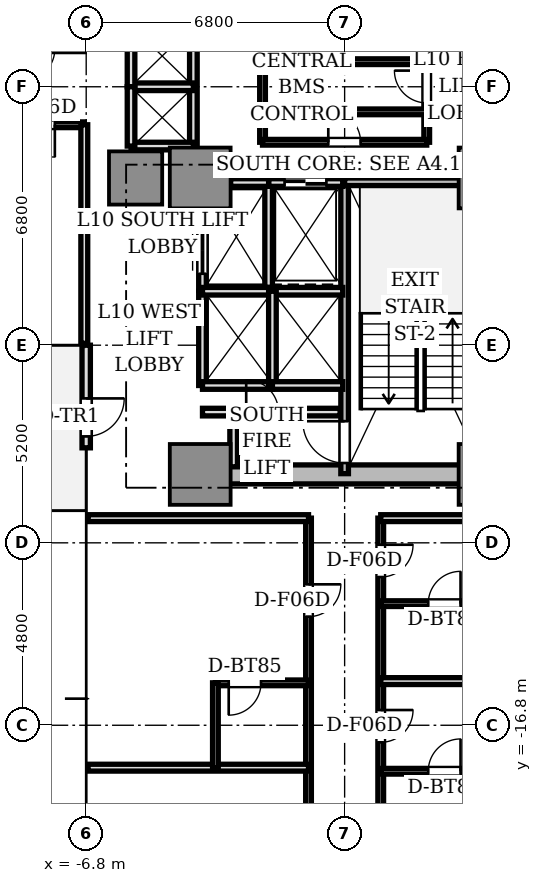
"""IFC4 building model, lengths in metres.
Left out: names, types, materials, properties, quantities, classifications, styles, units other than length and angle.
Written with IfcOpenShell. Run it as: python <this file> out.ifc"""

import sys

from ifc_helpers import new_model, si_unit, direction, frame, frame_2d, origin, origin_2d, place, context, subcontext, project, spatial, rectangle, extrude, source, transform, mapped, element, fill, save


model = new_model("IFC4")
c1 = context("Model", 3, precision=1e-05, world=origin(), true_north=direction((0.0, 1.0)))
c2 = subcontext(c1, "Body", "Model", "MODEL_VIEW")
j1 = project(units=[si_unit("LENGTHUNIT", "METRE"), si_unit("PLANEANGLEUNIT", "RADIAN")], contexts=[c1])
p1 = place(None, origin())
s1 = spatial("IfcSite", under=j1, at=p1, CompositionType="ELEMENT")
p2 = place(p1, origin())
s2 = spatial("IfcBuilding", under=s1, at=p2, CompositionType="ELEMENT")
p3 = place(p2, frame((0.0, 0.0, 39.85)))
s3 = spatial("IfcBuildingStorey", under=s2, at=p3, CompositionType="ELEMENT", Elevation=39.85)
p4 = place(p3, frame((-3.55, -10.2, 0.0), z_axis=(0.0, 0.0, 1.0), x_axis=(1.0, 0.0, 0.0)))
e1 = element("IfcWall", 1, at=p4, inside=s3, PredefinedType="SHEAR", context=c2, shape_type="SweptSolid", body=[
    extrude(rectangle(XDim=7.1, YDim=0.5, at=frame_2d((3.55, 0.0))), origin(), (0.0, 0.0, 1.0), 3.11),
])
m1 = source(origin(), c2, "Body", "SweptSolid", [
    extrude(rectangle(XDim=1.6, YDim=1.6, at=origin_2d()), origin(), (0.0, 0.0, 1.0), 3.11),
])
for number, where, z_axis, x_axis in (
    (2, (-3.8, -2.4, 0.0), (0.0, 0.0, 1.0), (1.0, 0.0, 0.0)),
    (3, (3.8, -2.4, 0.0), (0.0, 0.0, 1.0), (1.0, 0.0, 0.0)),
    (4, (-3.8, -10.2, 0.0), (0.0, 0.0, 1.0), (1.0, 0.0, 0.0)),
    (5, (3.8, -10.2, 0.0), (0.0, 0.0, 1.0), (1.0, 0.0, 0.0)),
):
    element("IfcColumn", number, at=place(p3, frame(where, z_axis=z_axis, x_axis=x_axis)), inside=s3, PredefinedType="COLUMN", context=c2, shape_type="MappedRepresentation", body=[
        mapped(m1, transform((0.0, 0.0, 0.0), scale=1.0)),
    ])
m2 = source(origin(), c2, "Body", "SweptSolid", [
    extrude(rectangle(XDim=1.4, YDim=1.4, at=origin_2d()), origin(), (0.0, 0.0, 1.0), 3.11),
])
p5 = place(p3, frame((-5.5, -2.4, 0.0), z_axis=(0.0, 0.0, 1.0), x_axis=(1.0, 0.0, 0.0)))
e6 = element("IfcColumn", 6, at=p5, inside=s3, PredefinedType="COLUMN", context=c2, shape_type="MappedRepresentation", body=[
    mapped(m2, transform((0.0, 0.0, 0.0), scale=1.0)),
])
p6 = place(p3, frame((-6.8, -6.8, 0.0), z_axis=(0.0, 0.0, 1.0), x_axis=(0.0, -1.0, 0.0)))
e7 = element("IfcWall", 7, at=p6, inside=s3, PredefinedType="STANDARD", context=c2, shape_type="SweptSolid", body=[
    extrude(rectangle(XDim=2.7, YDim=0.22, at=frame_2d((1.35, 0.0))), origin(), (0.0, 0.0, 1.0), 3.11),
])
p7 = place(p6, frame((1.4, 0.0, 0.0)))
e8 = element("IfcOpeningElement", 8, at=p7, cuts=e7, PredefinedType="OPENING", context=c2, shape_type="SweptSolid", body=[
    extrude(rectangle(XDim=1.0, YDim=2.2, at=frame_2d((0.5, 1.1))), frame((0.0, 0.12, 0.0), z_axis=(0.0, -1.0, 0.0), x_axis=(1.0, 0.0, 0.0)), (0.0, 0.0, 1.0), 0.24),
])
p8 = place(p3, frame((0.0, -10.18, 0.0), z_axis=(0.0, 0.0, 1.0), x_axis=(0.0, 1.0, 0.0)))
e9 = element("IfcWall", 9, at=p8, inside=s3, PredefinedType="SOLIDWALL", context=c2, shape_type="SweptSolid", body=[
    extrude(rectangle(XDim=7.68, YDim=0.2, at=frame_2d((3.84, 0.0))), origin(), (0.0, 0.0, 1.0), 3.11),
])
p9 = place(p8, frame((0.28, 0.0, 0.0)))
e10 = element("IfcOpeningElement", 10, at=p9, cuts=e9, PredefinedType="OPENING", context=c2, shape_type="SweptSolid", body=[
    extrude(rectangle(XDim=1.1, YDim=2.15, at=frame_2d((0.55, 1.075))), frame((0.0, 0.11, 0.0), z_axis=(0.0, -1.0, 0.0), x_axis=(1.0, 0.0, 0.0)), (0.0, 0.0, 1.0), 0.22),
])
p10 = place(p3, frame((0.0, -2.5, 0.0), z_axis=(0.0, 0.0, 1.0), x_axis=(1.0, 0.0, 0.0)))
e11 = element("IfcWall", 11, at=p10, inside=s3, PredefinedType="SOLIDWALL", context=c2, shape_type="SweptSolid", body=[
    extrude(rectangle(XDim=3.72, YDim=0.2, at=frame_2d((1.86, 0.0))), origin(), (0.0, 0.0, 1.0), 3.11),
])
p11 = place(p3, frame((-2.0, -5.28, 0.0), z_axis=(0.0, 0.0, 1.0), x_axis=(0.0, 1.0, 0.0)))
e12 = element("IfcWall", 12, at=p11, inside=s3, PredefinedType="SOLIDWALL", context=c2, shape_type="SweptSolid", body=[
    extrude(rectangle(XDim=2.78, YDim=0.2, at=frame_2d((1.39, 0.0))), origin(), (0.0, 0.0, 1.0), 2.66),
])
p12 = place(p3, frame((-2.0, -2.52, 0.0), z_axis=(0.0, 0.0, 1.0), x_axis=(1.0, 0.0, 0.0)))
e13 = element("IfcWall", 13, at=p12, inside=s3, PredefinedType="SOLIDWALL", context=c2, shape_type="SweptSolid", body=[
    extrude(rectangle(XDim=1.95, YDim=0.2, at=frame_2d((0.975, 0.0))), origin(), (0.0, 0.0, 1.0), 2.66),
])
p13 = place(p12, frame((0.42, 0.0, 0.0)))
e14 = element("IfcOpeningElement", 14, at=p13, cuts=e13, PredefinedType="OPENING", context=c2, shape_type="SweptSolid", body=[
    extrude(rectangle(XDim=1.1, YDim=2.2, at=frame_2d((0.55, 1.1))), frame((0.0, 0.11, 0.0), z_axis=(0.0, -1.0, 0.0), x_axis=(1.0, 0.0, 0.0)), (0.0, 0.0, 1.0), 0.22),
])
p14 = place(p3, frame((-3.0, -2.52, 0.0), z_axis=(0.0, 0.0, 1.0), x_axis=(1.0, 0.0, 0.0)))
e15 = element("IfcWall", 15, at=p14, inside=s3, PredefinedType="SOLIDWALL", context=c2, shape_type="SweptSolid", body=[
    extrude(rectangle(XDim=1.0, YDim=0.2, at=frame_2d((0.5, 0.0))), origin(), (0.0, 0.0, 1.0), 2.66),
])
p15 = place(p3, frame((-3.74, -5.36, 0.0), z_axis=(0.0, 0.0, 1.0), x_axis=(0.0, 1.0, 0.0)))
e16 = element("IfcWall", 16, at=p15, inside=s3, PredefinedType="SOLIDWALL", context=c2, shape_type="SweptSolid", body=[
    extrude(rectangle(XDim=2.08, YDim=0.2, at=frame_2d((1.04, 0.0))), origin(), (0.0, 0.0, 1.0), 2.66),
])
p16 = place(p15, frame((0.44, 0.0, 0.0)))
e17 = element("IfcOpeningElement", 17, at=p16, cuts=e16, PredefinedType="OPENING", context=c2, shape_type="SweptSolid", body=[
    extrude(rectangle(XDim=1.2, YDim=2.2, at=frame_2d((0.6, 1.1))), frame((0.0, 0.11, 0.0), z_axis=(0.0, -1.0, 0.0), x_axis=(1.0, 0.0, 0.0)), (0.0, 0.0, 1.0), 0.22),
])
p17 = place(p3, frame((-3.74, -7.86, 0.0), z_axis=(0.0, 0.0, 1.0), x_axis=(0.0, 1.0, 0.0)))
e18 = element("IfcWall", 18, at=p17, inside=s3, PredefinedType="SOLIDWALL", context=c2, shape_type="SweptSolid", body=[
    extrude(rectangle(XDim=2.48, YDim=0.2, at=frame_2d((1.24, 0.0))), origin(), (0.0, 0.0, 1.0), 2.66),
])
p18 = place(p3, frame((-3.74, -7.86, 0.0), z_axis=(0.0, 0.0, 1.0), x_axis=(1.0, 0.0, 0.0)))
e19 = element("IfcWall", 19, at=p18, inside=s3, PredefinedType="SOLIDWALL", context=c2, shape_type="SweptSolid", body=[
    extrude(rectangle(XDim=1.84, YDim=0.2, at=frame_2d((0.92, 0.0))), origin(), (0.0, 0.0, 1.0), 2.66),
])
p19 = place(p3, frame((-3.74, -5.38, 0.0), z_axis=(0.0, 0.0, 1.0), x_axis=(1.0, 0.0, 0.0)))
e20 = element("IfcWall", 20, at=p19, inside=s3, PredefinedType="SOLIDWALL", context=c2, shape_type="SweptSolid", body=[
    extrude(rectangle(XDim=3.69, YDim=0.2, at=frame_2d((1.845, 0.0))), origin(), (0.0, 0.0, 1.0), 2.66),
])
p20 = place(p3, frame((-1.9, -7.86, 0.0), z_axis=(0.0, 0.0, 1.0), x_axis=(0.0, 1.0, 0.0)))
e21 = element("IfcWall", 21, at=p20, inside=s3, PredefinedType="SOLIDWALL", context=c2, shape_type="SweptSolid", body=[
    extrude(rectangle(XDim=2.48, YDim=0.2, at=frame_2d((1.24, 0.0))), origin(), (0.0, 0.0, 1.0), 2.66),
])
p21 = place(p3, frame((-1.9, -7.86, 0.0), z_axis=(0.0, 0.0, 1.0), x_axis=(1.0, 0.0, 0.0)))
e22 = element("IfcWall", 22, at=p21, inside=s3, PredefinedType="SOLIDWALL", context=c2, shape_type="SweptSolid", body=[
    extrude(rectangle(XDim=1.85, YDim=0.2, at=frame_2d((0.925, 0.0))), origin(), (0.0, 0.0, 1.0), 2.66),
])
p22 = place(p3, frame((-3.98, -1.56, 0.0), z_axis=(0.0, 0.0, 1.0), x_axis=(0.0, 1.0, 0.0)))
e23 = element("IfcWall", 23, at=p22, inside=s3, PredefinedType="SOLIDWALL", context=c2, shape_type="SweptSolid", body=[
    extrude(rectangle(XDim=3.12, YDim=0.2, at=frame_2d((1.56, 0.0))), origin(), (0.0, 0.0, 1.0), 2.18),
])
for number, where, z_axis, x_axis in (
    (24, (-5.62, -1.56, 0.0), (0.0, 0.0, 1.0), (1.0, 0.0, 0.0)),
    (25, (-5.62, 0.0, 0.0), (0.0, 0.0, 1.0), (1.0, 0.0, 0.0)),
):
    element("IfcWall", number, at=place(p3, frame(where, z_axis=z_axis, x_axis=x_axis)), inside=s3, PredefinedType="SOLIDWALL", context=c2, shape_type="SweptSolid", body=[
        extrude(rectangle(XDim=1.64, YDim=0.2, at=frame_2d((0.82, 0.0))), origin(), (0.0, 0.0, 1.0), 2.66),
    ])
for number, where, z_axis, x_axis in (
    (26, (-5.62, 0.0, 0.0), (0.0, 0.0, 1.0), (0.0, 1.0, 0.0)),
    (27, (-5.62, -1.56, 0.0), (0.0, 0.0, 1.0), (0.0, 1.0, 0.0)),
):
    element("IfcWall", number, at=place(p3, frame(where, z_axis=z_axis, x_axis=x_axis)), inside=s3, PredefinedType="SOLIDWALL", context=c2, shape_type="SweptSolid", body=[
        extrude(rectangle(XDim=1.56, YDim=0.2, at=frame_2d((0.78, 0.0))), origin(), (0.0, 0.0, 1.0), 2.66),
    ])
p23 = place(p3, frame((-3.74, -8.56, 0.0), z_axis=(0.0, 0.0, 1.0), x_axis=(1.0, 0.0, 0.0)))
e28 = element("IfcWall", 28, at=p23, inside=s3, PredefinedType="SOLIDWALL", context=c2, shape_type="SweptSolid", body=[
    extrude(rectangle(XDim=3.62, YDim=0.2, at=frame_2d((1.81, 0.0))), origin(), (0.0, 0.0, 1.0), 2.66),
])
p24 = place(p23, frame((1.15, 0.0, 0.0)))
e29 = element("IfcOpeningElement", 29, at=p24, cuts=e28, PredefinedType="OPENING", context=c2, shape_type="SweptSolid", body=[
    extrude(rectangle(XDim=0.85, YDim=2.1, at=frame_2d((0.425, 1.05))), frame((0.0, 0.11, 0.0), z_axis=(0.0, -1.0, 0.0), x_axis=(1.0, 0.0, 0.0)), (0.0, 0.0, 1.0), 0.22),
])
p25 = place(p3, frame((-2.92, -10.0, 0.0), z_axis=(0.0, 0.0, 1.0), x_axis=(0.0, 1.0, 0.0)))
e30 = element("IfcWall", 30, at=p25, inside=s3, PredefinedType="SOLIDWALL", context=c2, shape_type="SweptSolid", body=[
    extrude(rectangle(XDim=1.44, YDim=0.2, at=frame_2d((0.72, 0.0))), origin(), (0.0, 0.0, 1.0), 2.66),
])
p26 = place(p3, frame((2.16, -1.46, 0.0), z_axis=(0.0, 0.0, 1.0), x_axis=(0.0, 1.0, 0.0)))
e31 = element("IfcWall", 31, at=p26, inside=s3, PredefinedType="PARTITIONING", context=c2, shape_type="SweptSolid", body=[
    extrude(rectangle(XDim=2.92, YDim=0.15, at=frame_2d((1.46, 0.0))), origin(), (0.0, 0.0, 1.0), 2.66),
])
p27 = place(p26, frame((1.035, 0.0, 0.0)))
e32 = element("IfcOpeningElement", 32, at=p27, cuts=e31, PredefinedType="OPENING", context=c2, shape_type="SweptSolid", body=[
    extrude(rectangle(XDim=0.85, YDim=2.1, at=frame_2d((0.425, 1.05))), frame((0.0, 0.085, 0.0), z_axis=(0.0, -1.0, 0.0), x_axis=(1.0, 0.0, 0.0)), (0.0, 0.0, 1.0), 0.17),
])
p28 = place(p3, frame((-2.16, -1.46, 0.0), z_axis=(0.0, 0.0, 1.0), x_axis=(0.0, 1.0, 0.0)))
e33 = element("IfcWall", 33, at=p28, inside=s3, PredefinedType="PARTITIONING", context=c2, shape_type="SweptSolid", body=[
    extrude(rectangle(XDim=2.92, YDim=0.15, at=frame_2d((1.46, 0.0))), origin(), (0.0, 0.0, 1.0), 2.66),
])
p29 = place(p3, frame((-2.16, -1.46, 0.0), z_axis=(0.0, 0.0, 1.0), x_axis=(1.0, 0.0, 0.0)))
e34 = element("IfcWall", 34, at=p29, inside=s3, PredefinedType="PARTITIONING", context=c2, shape_type="SweptSolid", body=[
    extrude(rectangle(XDim=4.32, YDim=0.15, at=frame_2d((2.16, 0.0))), origin(), (0.0, 0.0, 1.0), 2.66),
])
p30 = place(p29, frame((1.73, 0.0, 0.0)))
e35 = element("IfcOpeningElement", 35, at=p30, cuts=e34, PredefinedType="OPENING", context=c2, shape_type="SweptSolid", body=[
    extrude(rectangle(XDim=0.85, YDim=2.1, at=frame_2d((0.425, 1.05))), frame((0.0, 0.085, 0.0), z_axis=(0.0, -1.0, 0.0), x_axis=(1.0, 0.0, 0.0)), (0.0, 0.0, 1.0), 0.17),
])
for number, where, z_axis, x_axis in (
    (36, (-2.16, 0.66, 0.0), (0.0, 0.0, 1.0), (1.0, 0.0, 0.0)),
    (37, (-2.16, -0.66, 0.0), (0.0, 0.0, 1.0), (1.0, 0.0, 0.0)),
):
    element("IfcWall", number, at=place(p3, frame(where, z_axis=z_axis, x_axis=x_axis)), inside=s3, PredefinedType="PARTITIONING", context=c2, shape_type="SweptSolid", body=[
        extrude(rectangle(XDim=4.32, YDim=0.15, at=frame_2d((2.16, 0.0))), origin(), (0.0, 0.0, 1.0), 2.66),
    ])
p31 = place(p3, frame((-6.85, -1.0, 0.0), z_axis=(0.0, 0.0, 1.0), x_axis=(-1.0, 0.0, 0.0)))
e38 = element("IfcWall", 38, at=p31, inside=s3, PredefinedType="PARTITIONING", context=c2, shape_type="SweptSolid", body=[
    extrude(rectangle(XDim=2.5, YDim=0.15, at=frame_2d((1.25, 0.0))), origin(), (0.0, 0.0, 1.0), 2.66),
])
p32 = place(p31, frame((0.775, 0.0, 0.0)))
e39 = element("IfcOpeningElement", 39, at=p32, cuts=e38, PredefinedType="OPENING", context=c2, shape_type="SweptSolid", body=[
    extrude(rectangle(XDim=0.85, YDim=2.1, at=frame_2d((0.425, 1.05))), frame((0.0, 0.085, 0.0), z_axis=(0.0, -1.0, 0.0), x_axis=(1.0, 0.0, 0.0)), (0.0, 0.0, 1.0), 0.17),
])
p33 = place(p3, frame((-6.85, -1.0, 0.0), z_axis=(0.0, 0.0, 1.0), x_axis=(0.0, -1.0, 0.0)))
e40 = element("IfcWall", 40, at=p33, inside=s3, PredefinedType="PARTITIONING", context=c2, shape_type="SweptSolid", body=[
    extrude(rectangle(XDim=5.75, YDim=0.18, at=frame_2d((2.875, 0.0))), origin(), (0.0, 0.0, 1.0), 2.66),
])
p34 = place(p3, frame((0.95, -11.35, 0.0), z_axis=(0.0, 0.0, 1.0), x_axis=(0.0, -1.0, 0.0)))
e41 = element("IfcWall", 41, at=p34, inside=s3, PredefinedType="PARTITIONING", context=c2, shape_type="SweptSolid", body=[
    extrude(rectangle(XDim=13.4, YDim=0.15, at=frame_2d((6.7, 0.0))), origin(), (0.0, 0.0, 1.0), 2.66),
])
p35 = place(p34, frame((0.7, 0.0, 0.0)))
e42 = element("IfcOpeningElement", 42, at=p35, cuts=e41, PredefinedType="OPENING", context=c2, shape_type="SweptSolid", body=[
    extrude(rectangle(XDim=0.85, YDim=2.1, at=frame_2d((0.425, 1.05))), frame((0.0, 0.085, 0.0), z_axis=(0.0, -1.0, 0.0), x_axis=(1.0, 0.0, 0.0)), (0.0, 0.0, 1.0), 0.17),
])
p36 = place(p34, frame((5.049, 0.0, 0.0)))
e43 = element("IfcOpeningElement", 43, at=p36, cuts=e41, PredefinedType="OPENING", context=c2, shape_type="SweptSolid", body=[
    extrude(rectangle(XDim=0.85, YDim=2.1, at=frame_2d((0.425, 1.05))), frame((0.0, 0.085, 0.0), z_axis=(0.0, -1.0, 0.0), x_axis=(1.0, 0.0, 0.0)), (0.0, 0.0, 1.0), 0.17),
])
p37 = place(p34, frame((9.605, 0.0, 0.0)))
e44 = element("IfcOpeningElement", 44, at=p37, cuts=e41, PredefinedType="OPENING", context=c2, shape_type="SweptSolid", body=[
    extrude(rectangle(XDim=0.85, YDim=2.1, at=frame_2d((0.425, 1.05))), frame((0.0, 0.085, 0.0), z_axis=(0.0, -1.0, 0.0), x_axis=(1.0, 0.0, 0.0)), (0.0, 0.0, 1.0), 0.17),
])
p38 = place(p3, frame((-0.95, -11.35, 0.0), z_axis=(0.0, 0.0, 1.0), x_axis=(0.0, -1.0, 0.0)))
e45 = element("IfcWall", 45, at=p38, inside=s3, PredefinedType="PARTITIONING", context=c2, shape_type="SweptSolid", body=[
    extrude(rectangle(XDim=13.4, YDim=0.15, at=frame_2d((6.7, 0.0))), origin(), (0.0, 0.0, 1.0), 2.66),
])
p39 = place(p38, frame((1.742, 0.0, 0.0)))
e46 = element("IfcOpeningElement", 46, at=p39, cuts=e45, PredefinedType="OPENING", context=c2, shape_type="SweptSolid", body=[
    extrude(rectangle(XDim=0.85, YDim=2.1, at=frame_2d((0.425, 1.05))), frame((0.0, 0.085, 0.0), z_axis=(0.0, -1.0, 0.0), x_axis=(1.0, 0.0, 0.0)), (0.0, 0.0, 1.0), 0.17),
])
p40 = place(p38, frame((8.396, 0.0, 0.0)))
e47 = element("IfcOpeningElement", 47, at=p40, cuts=e45, PredefinedType="OPENING", context=c2, shape_type="SweptSolid", body=[
    extrude(rectangle(XDim=0.85, YDim=2.1, at=frame_2d((0.425, 1.05))), frame((0.0, 0.085, 0.0), z_axis=(0.0, -1.0, 0.0), x_axis=(1.0, 0.0, 0.0)), (0.0, 0.0, 1.0), 0.17),
])
for number, where, z_axis, x_axis in (
    (48, (0.95, -11.35, 0.0), (0.0, 0.0, 1.0), (1.0, 0.0, 0.0)),
    (49, (-6.75, -11.35, 0.0), (0.0, 0.0, 1.0), (1.0, 0.0, 0.0)),
    (50, (0.95, -15.638, 0.0), (0.0, 0.0, 1.0), (1.0, 0.0, 0.0)),
):
    element("IfcWall", number, at=place(p3, frame(where, z_axis=z_axis, x_axis=x_axis)), inside=s3, PredefinedType="PARTITIONING", context=c2, shape_type="SweptSolid", body=[
        extrude(rectangle(XDim=5.8, YDim=0.18, at=frame_2d((2.9, 0.0))), origin(), (0.0, 0.0, 1.0), 2.66),
    ])
p41 = place(p3, frame((0.95, -13.6, 0.0), z_axis=(0.0, 0.0, 1.0), x_axis=(1.0, 0.0, 0.0)))
e51 = element("IfcWall", 51, at=p41, inside=s3, PredefinedType="PARTITIONING", context=c2, shape_type="SweptSolid", body=[
    extrude(rectangle(XDim=2.45, YDim=0.15, at=frame_2d((1.225, 0.0))), origin(), (0.0, 0.0, 1.0), 2.66),
])
p42 = place(p41, frame((1.25, 0.0, 0.0)))
e52 = element("IfcOpeningElement", 52, at=p42, cuts=e51, PredefinedType="OPENING", context=c2, shape_type="SweptSolid", body=[
    extrude(rectangle(XDim=0.85, YDim=2.1, at=frame_2d((0.425, 1.05))), frame((0.0, 0.085, 0.0), z_axis=(0.0, -1.0, 0.0), x_axis=(1.0, 0.0, 0.0)), (0.0, 0.0, 1.0), 0.17),
])
p43 = place(p3, frame((0.95, -18.01, 0.0), z_axis=(0.0, 0.0, 1.0), x_axis=(1.0, 0.0, 0.0)))
e53 = element("IfcWall", 53, at=p43, inside=s3, PredefinedType="PARTITIONING", context=c2, shape_type="SweptSolid", body=[
    extrude(rectangle(XDim=2.45, YDim=0.15, at=frame_2d((1.225, 0.0))), origin(), (0.0, 0.0, 1.0), 2.66),
])
p44 = place(p43, frame((1.25, 0.0, 0.0)))
e54 = element("IfcOpeningElement", 54, at=p44, cuts=e53, PredefinedType="OPENING", context=c2, shape_type="SweptSolid", body=[
    extrude(rectangle(XDim=0.85, YDim=2.1, at=frame_2d((0.425, 1.05))), frame((0.0, 0.085, 0.0), z_axis=(0.0, -1.0, 0.0), x_axis=(1.0, 0.0, 0.0)), (0.0, 0.0, 1.0), 0.17),
])
p45 = place(p3, frame((-0.95, -17.916, 0.0), z_axis=(0.0, 0.0, 1.0), x_axis=(-1.0, 0.0, 0.0)))
e55 = element("IfcWall", 55, at=p45, inside=s3, PredefinedType="PARTITIONING", context=c2, shape_type="SweptSolid", body=[
    extrude(rectangle(XDim=5.8, YDim=0.18, at=frame_2d((2.9, 0.0))), origin(), (0.0, 0.0, 1.0), 2.66),
])
p46 = place(p3, frame((-0.95, -15.684, 0.0), z_axis=(0.0, 0.0, 1.0), x_axis=(-1.0, 0.0, 0.0)))
e56 = element("IfcWall", 56, at=p46, inside=s3, PredefinedType="PARTITIONING", context=c2, shape_type="SweptSolid", body=[
    extrude(rectangle(XDim=2.45, YDim=0.15, at=frame_2d((1.225, 0.0))), origin(), (0.0, 0.0, 1.0), 2.66),
])
p47 = place(p46, frame((1.25, 0.0, 0.0)))
e57 = element("IfcOpeningElement", 57, at=p47, cuts=e56, PredefinedType="OPENING", context=c2, shape_type="SweptSolid", body=[
    extrude(rectangle(XDim=0.85, YDim=2.1, at=frame_2d((0.425, 1.05))), frame((0.0, 0.085, 0.0), z_axis=(0.0, -1.0, 0.0), x_axis=(1.0, 0.0, 0.0)), (0.0, 0.0, 1.0), 0.17),
])
p48 = place(p3, frame((-3.4, -15.684, 0.0), z_axis=(0.0, 0.0, 1.0), x_axis=(0.0, -1.0, 0.0)))
e58 = element("IfcWall", 58, at=p48, inside=s3, PredefinedType="PARTITIONING", context=c2, shape_type="SweptSolid", body=[
    extrude(rectangle(XDim=2.232, YDim=0.15, at=frame_2d((1.116, 0.0))), origin(), (0.0, 0.0, 1.0), 2.66),
])
m3 = source(origin(), c2, "Body", "SweptSolid", [
    extrude(rectangle(XDim=1.0, YDim=0.05, at=origin_2d()), origin(), (0.0, 0.0, 1.0), 2.2),
])
p49 = place(p7, frame((0.5, 0.0, 0.0)))
e59 = element("IfcDoor", 59, at=p49, inside=s3, OperationType="SINGLE_SWING_LEFT", PredefinedType="DOOR", context=c2, shape_type="MappedRepresentation", body=[
    mapped(m3, transform((0.0, 0.0, 0.0), scale=1.0)),
])
fill(e8, e59)
m4 = source(origin(), c2, "Body", "SweptSolid", [
    extrude(rectangle(XDim=1.1, YDim=0.05, at=origin_2d()), origin(), (0.0, 0.0, 1.0), 2.2),
])
p50 = place(p13, frame((0.55, 0.0, 0.0)))
e60 = element("IfcDoor", 60, at=p50, inside=s3, OperationType="DOUBLE_DOOR_SLIDING", PredefinedType="DOOR", context=c2, shape_type="MappedRepresentation", body=[
    mapped(m4, transform((0.0, 0.0, 0.0), scale=1.0)),
])
fill(e14, e60)
m5 = source(origin(), c2, "Body", "SweptSolid", [
    extrude(rectangle(XDim=1.2, YDim=0.05, at=origin_2d()), origin(), (0.0, 0.0, 1.0), 2.2),
])
p51 = place(p16, frame((0.6, 0.0, 0.0)))
e61 = element("IfcDoor", 61, at=p51, inside=s3, OperationType="DOUBLE_DOOR_SLIDING", PredefinedType="DOOR", context=c2, shape_type="MappedRepresentation", body=[
    mapped(m5, transform((0.0, 0.0, 0.0), scale=1.0)),
])
fill(e17, e61)
m6 = source(origin(), c2, "Body", "SweptSolid", [
    extrude(rectangle(XDim=1.1, YDim=0.05, at=origin_2d()), origin(), (0.0, 0.0, 1.0), 2.15),
])
p52 = place(p9, frame((0.55, 0.0, 0.0)))
e62 = element("IfcDoor", 62, at=p52, inside=s3, OperationType="SINGLE_SWING_RIGHT", PredefinedType="DOOR", context=c2, shape_type="MappedRepresentation", body=[
    mapped(m6, transform((0.0, 0.0, 0.0), scale=1.0)),
])
fill(e10, e62)
m7 = source(origin(), c2, "Body", "SweptSolid", [
    extrude(rectangle(XDim=0.85, YDim=0.05, at=origin_2d()), origin(), (0.0, 0.0, 1.0), 2.1),
])
p53 = place(p24, frame((0.425, 0.0, 0.0)))
e63 = element("IfcDoor", 63, at=p53, inside=s3, OperationType="SINGLE_SWING_LEFT", PredefinedType="DOOR", context=c2, shape_type="MappedRepresentation", body=[
    mapped(m7, transform((0.0, 0.0, 0.0), scale=1.0)),
])
fill(e29, e63)
p54 = place(p27, frame((0.425, 0.0, 0.0)))
e64 = element("IfcDoor", 64, at=p54, inside=s3, OperationType="SINGLE_SWING_RIGHT", PredefinedType="DOOR", context=c2, shape_type="MappedRepresentation", body=[
    mapped(m7, transform((0.0, 0.0, 0.0), scale=1.0)),
])
fill(e32, e64)
p55 = place(p30, frame((0.425, 0.0, 0.0)))
e65 = element("IfcDoor", 65, at=p55, inside=s3, OperationType="SINGLE_SWING_LEFT", PredefinedType="DOOR", context=c2, shape_type="MappedRepresentation", body=[
    mapped(m7, transform((0.0, 0.0, 0.0), scale=1.0)),
])
fill(e35, e65)
p56 = place(p32, frame((0.425, 0.0, 0.0)))
e66 = element("IfcDoor", 66, at=p56, inside=s3, OperationType="SINGLE_SWING_LEFT", PredefinedType="DOOR", context=c2, shape_type="MappedRepresentation", body=[
    mapped(m7, transform((0.0, 0.0, 0.0), scale=1.0)),
])
fill(e39, e66)
p57 = place(p42, frame((0.425, 0.0, 0.0)))
e67 = element("IfcDoor", 67, at=p57, inside=s3, OperationType="SINGLE_SWING_RIGHT", PredefinedType="DOOR", context=c2, shape_type="MappedRepresentation", body=[
    mapped(m7, transform((0.0, 0.0, 0.0), scale=1.0)),
])
fill(e52, e67)
p58 = place(p35, frame((0.425, 0.0, 0.0)))
e68 = element("IfcDoor", 68, at=p58, inside=s3, OperationType="SINGLE_SWING_LEFT", PredefinedType="DOOR", context=c2, shape_type="MappedRepresentation", body=[
    mapped(m7, transform((0.0, 0.0, 0.0), scale=1.0)),
])
fill(e42, e68)
p59 = place(p44, frame((0.425, 0.0, 0.0)))
e69 = element("IfcDoor", 69, at=p59, inside=s3, OperationType="SINGLE_SWING_RIGHT", PredefinedType="DOOR", context=c2, shape_type="MappedRepresentation", body=[
    mapped(m7, transform((0.0, 0.0, 0.0), scale=1.0)),
])
fill(e54, e69)
p60 = place(p36, frame((0.425, 0.0, 0.0)))
e70 = element("IfcDoor", 70, at=p60, inside=s3, OperationType="SINGLE_SWING_LEFT", PredefinedType="DOOR", context=c2, shape_type="MappedRepresentation", body=[
    mapped(m7, transform((0.0, 0.0, 0.0), scale=1.0)),
])
fill(e43, e70)
p61 = place(p47, frame((0.425, 0.0, 0.0)))
e71 = element("IfcDoor", 71, at=p61, inside=s3, OperationType="SINGLE_SWING_RIGHT", PredefinedType="DOOR", context=c2, shape_type="MappedRepresentation", body=[
    mapped(m7, transform((0.0, 0.0, 0.0), scale=1.0)),
])
fill(e57, e71)
p62 = place(p39, frame((0.425, 0.0, 0.0)))
e72 = element("IfcDoor", 72, at=p62, inside=s3, OperationType="SINGLE_SWING_LEFT", PredefinedType="DOOR", context=c2, shape_type="MappedRepresentation", body=[
    mapped(m7, transform((0.0, 0.0, 0.0), scale=1.0)),
])
fill(e46, e72)
save(model, sys.argv[1])
